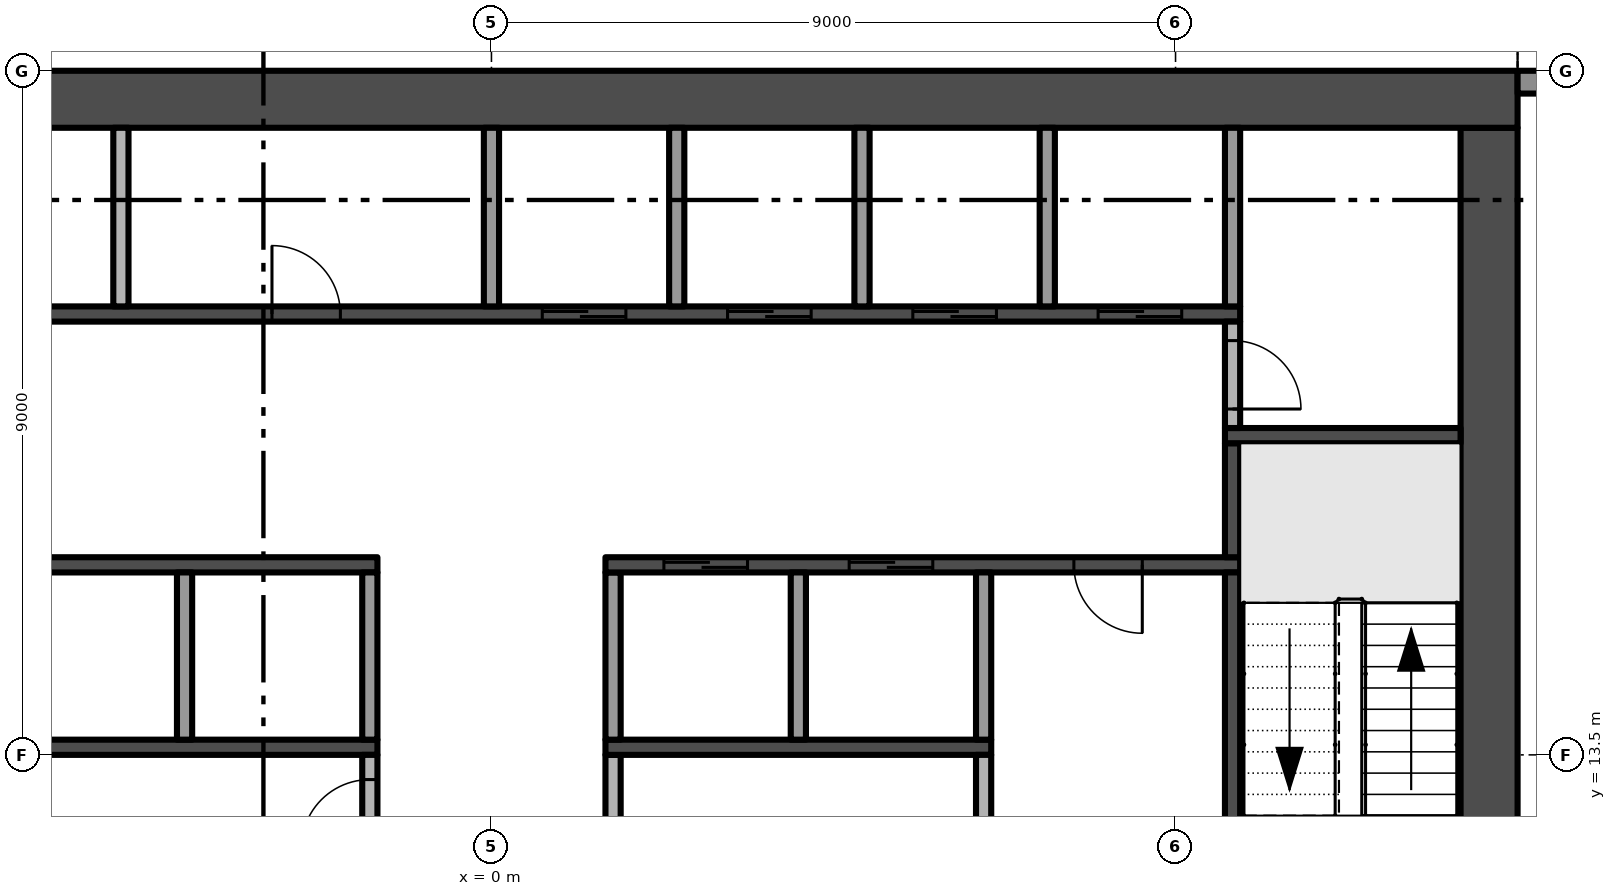
"""IFC4 building model, lengths in metres.
Left out: names, types, materials, properties, quantities, classifications, styles, units other than length and angle.
Written with IfcOpenShell. Run it as: python <this file> out.ifc"""

import sys

from ifc_helpers import new_model, si_unit, direction, frame, frame_2d, origin, place, context, subcontext, project, spatial, rectangle, extrude, element, fill, save


model = new_model("IFC4")
c1 = context("Model", 3, precision=1e-05, world=origin(), true_north=direction((0.0, 1.0)))
c2 = subcontext(c1, "Body", "Model", "MODEL_VIEW")
j1 = project(units=[si_unit("LENGTHUNIT", "METRE"), si_unit("PLANEANGLEUNIT", "RADIAN")], contexts=[c1])
p1 = place(None, origin())
s1 = spatial("IfcSite", under=j1, at=p1, CompositionType="ELEMENT")
p2 = place(p1, origin())
s2 = spatial("IfcBuilding", under=s1, at=p2, CompositionType="ELEMENT")
p3 = place(p2, frame((0.0, 0.0, 166.8)))
s3 = spatial("IfcBuildingStorey", under=s2, at=p3, CompositionType="ELEMENT", Elevation=166.8)
p4 = place(p3, frame((13.125, 5.25, -0.3), z_axis=(0.0, 0.0, 1.0), x_axis=(0.0, 1.0, 0.0)))
e1 = element("IfcWall", 1, at=p4, inside=s3, PredefinedType="SHEAR", context=c2, shape_type="SweptSolid", body=[
    extrude(rectangle(XDim=16.5, YDim=0.75, at=frame_2d((8.25, 0.0))), origin(), (0.0, 0.0, 1.0), 3.8),
])
p5 = place(p4, frame((6.15, 0.0, 0.3)))
e2 = element("IfcOpeningElement", 2, at=p5, cuts=e1, PredefinedType="OPENING", context=c2, shape_type="SweptSolid", body=[
    extrude(rectangle(XDim=1.2, YDim=2.2, at=frame_2d((0.6, 1.1))), frame((0.0, 0.385, 0.0), z_axis=(0.0, -1.0, 0.0), x_axis=(1.0, 0.0, 0.0)), (0.0, 0.0, 1.0), 0.77),
])
p6 = place(p3, frame((13.5, 22.125, -0.3), z_axis=(0.0, 0.0, 1.0), x_axis=(-1.0, 0.0, 0.0)))
e3 = element("IfcWall", 3, at=p6, inside=s3, PredefinedType="SHEAR", context=c2, shape_type="SweptSolid", body=[
    extrude(rectangle(XDim=27.0, YDim=0.75, at=frame_2d((13.5, 0.0))), origin(), (0.0, 0.0, 1.0), 3.8),
])
p7 = place(p3, frame((13.5, 22.35, 0.0), z_axis=(0.0, 0.0, 1.0), x_axis=(1.0, 0.0, 0.0)))
e4 = element("IfcWall", 4, at=p7, inside=s3, PredefinedType="SOLIDWALL", context=c2, shape_type="SweptSolid", body=[
    extrude(rectangle(XDim=3.4, YDim=0.3, at=frame_2d((1.7, 0.0))), origin(), (0.0, 0.0, 1.0), 3.5),
])
p8 = place(p7, frame((2.05, 0.0, 0.45)))
e5 = element("IfcOpeningElement", 5, at=p8, cuts=e4, PredefinedType="OPENING", context=c2, shape_type="SweptSolid", body=[
    extrude(rectangle(XDim=1.05, YDim=2.65, at=frame_2d((0.525, 1.325))), frame((0.0, 0.16, 0.0), z_axis=(0.0, -1.0, 0.0), x_axis=(1.0, 0.0, 0.0)), (0.0, 0.0, 1.0), 0.32),
])
p9 = place(p7, frame((0.7, 0.0, 0.0)))
e6 = element("IfcOpeningElement", 6, at=p9, cuts=e4, PredefinedType="OPENING", context=c2, shape_type="SweptSolid", body=[
    extrude(rectangle(XDim=1.2, YDim=2.4, at=frame_2d((0.6, 1.2))), frame((0.0, 0.16, 0.0), z_axis=(0.0, -1.0, 0.0), x_axis=(1.0, 0.0, 0.0)), (0.0, 0.0, 1.0), 0.32),
])
p10 = place(p3, frame((-1.5, 16.0, 0.0), z_axis=(0.0, 0.0, 1.0), x_axis=(-1.0, 0.0, 0.0)))
e7 = element("IfcWall", 7, at=p10, inside=s3, PredefinedType="SHEAR", context=c2, shape_type="SweptSolid", body=[
    extrude(rectangle(XDim=8.35, YDim=0.2, at=frame_2d((4.175, 0.0))), origin(), (0.0, 0.0, 1.0), 3.5),
])
p11 = place(p10, frame((6.162, 0.0, 0.0)))
e8 = element("IfcOpeningElement", 8, at=p11, cuts=e7, PredefinedType="OPENING", context=c2, shape_type="SweptSolid", body=[
    extrude(rectangle(XDim=0.9, YDim=2.1, at=frame_2d((0.45, 1.05))), frame((0.0, 0.11, 0.0), z_axis=(0.0, -1.0, 0.0), x_axis=(1.0, 0.0, 0.0)), (0.0, 0.0, 1.0), 0.22),
])
p12 = place(p3, frame((-9.85, 19.3, 0.0), z_axis=(0.0, 0.0, 1.0), x_axis=(1.0, 0.0, 0.0)))
e9 = element("IfcWall", 9, at=p12, inside=s3, PredefinedType="SHEAR", context=c2, shape_type="SweptSolid", body=[
    extrude(rectangle(XDim=19.7, YDim=0.2, at=frame_2d((9.85, 0.0))), origin(), (0.0, 0.0, 1.0), 3.5),
])
p13 = place(p12, frame((10.519, 0.0, 0.0)))
e10 = element("IfcOpeningElement", 10, at=p13, cuts=e9, PredefinedType="OPENING", context=c2, shape_type="SweptSolid", body=[
    extrude(rectangle(XDim=1.1, YDim=2.1, at=frame_2d((0.55, 1.05))), frame((0.0, 0.11, 0.0), z_axis=(0.0, -1.0, 0.0), x_axis=(1.0, 0.0, 0.0)), (0.0, 0.0, 1.0), 0.22),
])
p14 = place(p12, frame((12.956, 0.0, 0.0)))
e11 = element("IfcOpeningElement", 11, at=p14, cuts=e9, PredefinedType="OPENING", context=c2, shape_type="SweptSolid", body=[
    extrude(rectangle(XDim=1.1, YDim=2.1, at=frame_2d((0.55, 1.05))), frame((0.0, 0.11, 0.0), z_axis=(0.0, -1.0, 0.0), x_axis=(1.0, 0.0, 0.0)), (0.0, 0.0, 1.0), 0.22),
])
p15 = place(p12, frame((15.394, 0.0, 0.0)))
e12 = element("IfcOpeningElement", 12, at=p15, cuts=e9, PredefinedType="OPENING", context=c2, shape_type="SweptSolid", body=[
    extrude(rectangle(XDim=1.1, YDim=2.1, at=frame_2d((0.55, 1.05))), frame((0.0, 0.11, 0.0), z_axis=(0.0, -1.0, 0.0), x_axis=(1.0, 0.0, 0.0)), (0.0, 0.0, 1.0), 0.22),
])
p16 = place(p12, frame((17.831, 0.0, 0.0)))
e13 = element("IfcOpeningElement", 13, at=p16, cuts=e9, PredefinedType="OPENING", context=c2, shape_type="SweptSolid", body=[
    extrude(rectangle(XDim=1.1, YDim=2.1, at=frame_2d((0.55, 1.05))), frame((0.0, 0.11, 0.0), z_axis=(0.0, -1.0, 0.0), x_axis=(1.0, 0.0, 0.0)), (0.0, 0.0, 1.0), 0.22),
])
p17 = place(p12, frame((2.087, 0.0, 0.0)))
e14 = element("IfcOpeningElement", 14, at=p17, cuts=e9, PredefinedType="OPENING", context=c2, shape_type="SweptSolid", body=[
    extrude(rectangle(XDim=0.9, YDim=2.1, at=frame_2d((0.45, 1.05))), frame((0.0, 0.11, 0.0), z_axis=(0.0, -1.0, 0.0), x_axis=(1.0, 0.0, 0.0)), (0.0, 0.0, 1.0), 0.22),
])
p18 = place(p12, frame((6.963, 0.0, 0.0)))
e15 = element("IfcOpeningElement", 15, at=p18, cuts=e9, PredefinedType="OPENING", context=c2, shape_type="SweptSolid", body=[
    extrude(rectangle(XDim=0.9, YDim=2.1, at=frame_2d((0.45, 1.05))), frame((0.0, 0.11, 0.0), z_axis=(0.0, -1.0, 0.0), x_axis=(1.0, 0.0, 0.0)), (0.0, 0.0, 1.0), 0.22),
])
p19 = place(p3, frame((-6.575, 13.6, 0.0), z_axis=(0.0, 0.0, 1.0), x_axis=(1.0, 0.0, 0.0)))
e16 = element("IfcWall", 16, at=p19, inside=s3, PredefinedType="SHEAR", context=c2, shape_type="SweptSolid", body=[
    extrude(rectangle(XDim=5.075, YDim=0.2, at=frame_2d((2.538, 0.0))), origin(), (0.0, 0.0, 1.0), 3.5),
])
p20 = place(p3, frame((-4.875, 19.4, 0.0), z_axis=(0.0, 0.0, 1.0), x_axis=(0.0, 1.0, 0.0)))
e17 = element("IfcWall", 17, at=p20, inside=s3, PredefinedType="PARTITIONING", context=c2, shape_type="SweptSolid", body=[
    extrude(rectangle(XDim=2.35, YDim=0.2, at=frame_2d((1.175, 0.0))), origin(), (0.0, 0.0, 1.0), 3.5),
])
p21 = place(p3, frame((-4.037, 13.7, 0.0), z_axis=(0.0, 0.0, 1.0), x_axis=(0.0, 1.0, 0.0)))
e18 = element("IfcWall", 18, at=p21, inside=s3, PredefinedType="PARTITIONING", context=c2, shape_type="SweptSolid", body=[
    extrude(rectangle(XDim=2.2, YDim=0.2, at=frame_2d((1.1, 0.0))), origin(), (0.0, 0.0, 1.0), 3.5),
])
p22 = place(p3, frame((-1.6, 11.95, 0.0), z_axis=(0.0, 0.0, 1.0), x_axis=(0.0, 1.0, 0.0)))
e19 = element("IfcWall", 19, at=p22, inside=s3, PredefinedType="PARTITIONING", context=c2, shape_type="SweptSolid", body=[
    extrude(rectangle(XDim=1.55, YDim=0.2, at=frame_2d((0.775, 0.0))), origin(), (0.0, 0.0, 1.0), 3.5),
])
p23 = place(p22, frame((0.325, 0.0, 0.0)))
e20 = element("IfcOpeningElement", 20, at=p23, cuts=e19, PredefinedType="OPENING", context=c2, shape_type="SweptSolid", body=[
    extrude(rectangle(XDim=0.9, YDim=2.1, at=frame_2d((0.45, 1.05))), frame((0.0, 0.11, 0.0), z_axis=(0.0, -1.0, 0.0), x_axis=(1.0, 0.0, 0.0)), (0.0, 0.0, 1.0), 0.22),
])
p24 = place(p3, frame((-1.6, 13.7, 0.0), z_axis=(0.0, 0.0, 1.0), x_axis=(0.0, 1.0, 0.0)))
e21 = element("IfcWall", 21, at=p24, inside=s3, PredefinedType="PARTITIONING", context=c2, shape_type="SweptSolid", body=[
    extrude(rectangle(XDim=2.2, YDim=0.2, at=frame_2d((1.1, 0.0))), origin(), (0.0, 0.0, 1.0), 3.5),
])
p25 = place(p3, frame((0.0, 19.4, 0.0), z_axis=(0.0, 0.0, 1.0), x_axis=(0.0, 1.0, 0.0)))
e22 = element("IfcWall", 22, at=p25, inside=s3, PredefinedType="PARTITIONING", context=c2, shape_type="SweptSolid", body=[
    extrude(rectangle(XDim=2.35, YDim=0.2, at=frame_2d((1.175, 0.0))), origin(), (0.0, 0.0, 1.0), 3.5),
])
p26 = place(p3, frame((1.6, 13.5, 0.0), z_axis=(0.0, 0.0, 1.0), x_axis=(0.0, -1.0, 0.0)))
e23 = element("IfcWall", 23, at=p26, inside=s3, PredefinedType="PARTITIONING", context=c2, shape_type="SweptSolid", body=[
    extrude(rectangle(XDim=2.9, YDim=0.2, at=frame_2d((1.45, 0.0))), origin(), (0.0, 0.0, 1.0), 3.5),
])
p27 = place(p26, frame((1.0, 0.0, 0.0)))
e24 = element("IfcOpeningElement", 24, at=p27, cuts=e23, PredefinedType="OPENING", context=c2, shape_type="SweptSolid", body=[
    extrude(rectangle(XDim=0.9, YDim=2.1, at=frame_2d((0.45, 1.05))), frame((0.0, 0.11, 0.0), z_axis=(0.0, -1.0, 0.0), x_axis=(1.0, 0.0, 0.0)), (0.0, 0.0, 1.0), 0.22),
])
p28 = place(p3, frame((1.5, 13.6, 0.0), z_axis=(0.0, 0.0, 1.0), x_axis=(1.0, 0.0, 0.0)))
e25 = element("IfcWall", 25, at=p28, inside=s3, PredefinedType="SHEAR", context=c2, shape_type="SweptSolid", body=[
    extrude(rectangle(XDim=5.075, YDim=0.2, at=frame_2d((2.538, 0.0))), origin(), (0.0, 0.0, 1.0), 3.5),
])
p29 = place(p3, frame((1.6, 13.7, 0.0), z_axis=(0.0, 0.0, 1.0), x_axis=(0.0, 1.0, 0.0)))
e26 = element("IfcWall", 26, at=p29, inside=s3, PredefinedType="PARTITIONING", context=c2, shape_type="SweptSolid", body=[
    extrude(rectangle(XDim=2.2, YDim=0.2, at=frame_2d((1.1, 0.0))), origin(), (0.0, 0.0, 1.0), 3.5),
])
p30 = place(p3, frame((9.85, 16.0, 0.0), z_axis=(0.0, 0.0, 1.0), x_axis=(-1.0, 0.0, 0.0)))
e27 = element("IfcWall", 27, at=p30, inside=s3, PredefinedType="SHEAR", context=c2, shape_type="SweptSolid", body=[
    extrude(rectangle(XDim=8.35, YDim=0.2, at=frame_2d((4.175, 0.0))), origin(), (0.0, 0.0, 1.0), 3.5),
])
p31 = place(p30, frame((6.481, 0.0, 0.0)))
e28 = element("IfcOpeningElement", 28, at=p31, cuts=e27, PredefinedType="OPENING", context=c2, shape_type="SweptSolid", body=[
    extrude(rectangle(XDim=1.1, YDim=2.1, at=frame_2d((0.55, 1.05))), frame((0.0, 0.11, 0.0), z_axis=(0.0, -1.0, 0.0), x_axis=(1.0, 0.0, 0.0)), (0.0, 0.0, 1.0), 0.22),
])
p32 = place(p30, frame((4.044, 0.0, 0.0)))
e29 = element("IfcOpeningElement", 29, at=p32, cuts=e27, PredefinedType="OPENING", context=c2, shape_type="SweptSolid", body=[
    extrude(rectangle(XDim=1.1, YDim=2.1, at=frame_2d((0.55, 1.05))), frame((0.0, 0.11, 0.0), z_axis=(0.0, -1.0, 0.0), x_axis=(1.0, 0.0, 0.0)), (0.0, 0.0, 1.0), 0.22),
])
p33 = place(p30, frame((1.288, 0.0, 0.0)))
e30 = element("IfcOpeningElement", 30, at=p33, cuts=e27, PredefinedType="OPENING", context=c2, shape_type="SweptSolid", body=[
    extrude(rectangle(XDim=0.9, YDim=2.1, at=frame_2d((0.45, 1.05))), frame((0.0, 0.11, 0.0), z_axis=(0.0, -1.0, 0.0), x_axis=(1.0, 0.0, 0.0)), (0.0, 0.0, 1.0), 0.22),
])
p34 = place(p3, frame((2.438, 19.4, 0.0), z_axis=(0.0, 0.0, 1.0), x_axis=(0.0, 1.0, 0.0)))
e31 = element("IfcWall", 31, at=p34, inside=s3, PredefinedType="PARTITIONING", context=c2, shape_type="SweptSolid", body=[
    extrude(rectangle(XDim=2.35, YDim=0.2, at=frame_2d((1.175, 0.0))), origin(), (0.0, 0.0, 1.0), 3.5),
])
p35 = place(p3, frame((4.037, 13.7, 0.0), z_axis=(0.0, 0.0, 1.0), x_axis=(0.0, 1.0, 0.0)))
e32 = element("IfcWall", 32, at=p35, inside=s3, PredefinedType="PARTITIONING", context=c2, shape_type="SweptSolid", body=[
    extrude(rectangle(XDim=2.2, YDim=0.2, at=frame_2d((1.1, 0.0))), origin(), (0.0, 0.0, 1.0), 3.5),
])
p36 = place(p3, frame((4.875, 19.4, 0.0), z_axis=(0.0, 0.0, 1.0), x_axis=(0.0, 1.0, 0.0)))
e33 = element("IfcWall", 33, at=p36, inside=s3, PredefinedType="PARTITIONING", context=c2, shape_type="SweptSolid", body=[
    extrude(rectangle(XDim=2.35, YDim=0.2, at=frame_2d((1.175, 0.0))), origin(), (0.0, 0.0, 1.0), 3.5),
])
p37 = place(p3, frame((6.475, 12.3, 0.0), z_axis=(0.0, 0.0, 1.0), x_axis=(0.0, 1.0, 0.0)))
e34 = element("IfcWall", 34, at=p37, inside=s3, PredefinedType="PARTITIONING", context=c2, shape_type="SweptSolid", body=[
    extrude(rectangle(XDim=1.2, YDim=0.2, at=frame_2d((0.6, 0.0))), origin(), (0.0, 0.0, 1.0), 3.5),
])
p38 = place(p3, frame((6.475, 13.7, 0.0), z_axis=(0.0, 0.0, 1.0), x_axis=(0.0, 1.0, 0.0)))
e35 = element("IfcWall", 35, at=p38, inside=s3, PredefinedType="PARTITIONING", context=c2, shape_type="SweptSolid", body=[
    extrude(rectangle(XDim=2.2, YDim=0.2, at=frame_2d((1.1, 0.0))), origin(), (0.0, 0.0, 1.0), 3.5),
])
p39 = place(p3, frame((7.312, 19.4, 0.0), z_axis=(0.0, 0.0, 1.0), x_axis=(0.0, 1.0, 0.0)))
e36 = element("IfcWall", 36, at=p39, inside=s3, PredefinedType="PARTITIONING", context=c2, shape_type="SweptSolid", body=[
    extrude(rectangle(XDim=2.35, YDim=0.2, at=frame_2d((1.175, 0.0))), origin(), (0.0, 0.0, 1.0), 3.5),
])
p40 = place(p3, frame((9.75, 12.3, 0.0), z_axis=(0.0, 0.0, 1.0), x_axis=(0.0, 1.0, 0.0)))
e37 = element("IfcWall", 37, at=p40, inside=s3, PredefinedType="SHEAR", context=c2, shape_type="SweptSolid", body=[
    extrude(rectangle(XDim=3.6, YDim=0.2, at=frame_2d((1.8, 0.0))), origin(), (0.0, 0.0, 1.0), 3.5),
])
p41 = place(p3, frame((9.75, 16.1, 0.0), z_axis=(0.0, 0.0, 1.0), x_axis=(0.0, 1.0, 0.0)))
e38 = element("IfcWall", 38, at=p41, inside=s3, PredefinedType="SHEAR", context=c2, shape_type="SweptSolid", body=[
    extrude(rectangle(XDim=1.5, YDim=0.2, at=frame_2d((0.75, 0.0))), origin(), (0.0, 0.0, 1.0), 3.5),
])
p42 = place(p3, frame((9.65, 17.7, 0.0), z_axis=(0.0, 0.0, 1.0), x_axis=(1.0, 0.0, 0.0)))
e39 = element("IfcWall", 39, at=p42, inside=s3, PredefinedType="SHEAR", context=c2, shape_type="SweptSolid", body=[
    extrude(rectangle(XDim=3.1, YDim=0.2, at=frame_2d((1.55, 0.0))), origin(), (0.0, 0.0, 1.0), 3.5),
])
p43 = place(p3, frame((9.75, 19.2, 0.0), z_axis=(0.0, 0.0, 1.0), x_axis=(0.0, -1.0, 0.0)))
e40 = element("IfcWall", 40, at=p43, inside=s3, PredefinedType="PARTITIONING", context=c2, shape_type="SweptSolid", body=[
    extrude(rectangle(XDim=1.4, YDim=0.2, at=frame_2d((0.7, 0.0))), origin(), (0.0, 0.0, 1.0), 3.5),
])
p44 = place(p43, frame((0.25, 0.0, 0.0)))
e41 = element("IfcOpeningElement", 41, at=p44, cuts=e40, PredefinedType="OPENING", context=c2, shape_type="SweptSolid", body=[
    extrude(rectangle(XDim=0.9, YDim=2.1, at=frame_2d((0.45, 1.05))), frame((0.0, 0.11, 0.0), z_axis=(0.0, -1.0, 0.0), x_axis=(1.0, 0.0, 0.0)), (0.0, 0.0, 1.0), 0.22),
])
p45 = place(p3, frame((9.75, 19.4, 0.0), z_axis=(0.0, 0.0, 1.0), x_axis=(0.0, 1.0, 0.0)))
e42 = element("IfcWall", 42, at=p45, inside=s3, PredefinedType="PARTITIONING", context=c2, shape_type="SweptSolid", body=[
    extrude(rectangle(XDim=2.35, YDim=0.2, at=frame_2d((1.175, 0.0))), origin(), (0.0, 0.0, 1.0), 3.5),
])
p46 = place(p13, origin())
e43 = element("IfcDoor", 43, at=p46, inside=s3, OperationType="SLIDING_TO_RIGHT", PredefinedType="DOOR", context=c2, shape_type="SweptSolid", body=[
    extrude(rectangle(XDim=1.1, YDim=2.1, at=frame_2d((0.55, 1.05))), frame((0.0, 0.025, 0.0), z_axis=(0.0, -1.0, 0.0), x_axis=(1.0, 0.0, 0.0)), (0.0, 0.0, 1.0), 0.05),
])
fill(e10, e43)
p47 = place(p14, origin())
e44 = element("IfcDoor", 44, at=p47, inside=s3, OperationType="SLIDING_TO_RIGHT", PredefinedType="DOOR", context=c2, shape_type="SweptSolid", body=[
    extrude(rectangle(XDim=1.1, YDim=2.1, at=frame_2d((0.55, 1.05))), frame((0.0, 0.025, 0.0), z_axis=(0.0, -1.0, 0.0), x_axis=(1.0, 0.0, 0.0)), (0.0, 0.0, 1.0), 0.05),
])
fill(e11, e44)
p48 = place(p15, origin())
e45 = element("IfcDoor", 45, at=p48, inside=s3, OperationType="SLIDING_TO_RIGHT", PredefinedType="DOOR", context=c2, shape_type="SweptSolid", body=[
    extrude(rectangle(XDim=1.1, YDim=2.1, at=frame_2d((0.55, 1.05))), frame((0.0, 0.025, 0.0), z_axis=(0.0, -1.0, 0.0), x_axis=(1.0, 0.0, 0.0)), (0.0, 0.0, 1.0), 0.05),
])
fill(e12, e45)
p49 = place(p16, origin())
e46 = element("IfcDoor", 46, at=p49, inside=s3, OperationType="SLIDING_TO_RIGHT", PredefinedType="DOOR", context=c2, shape_type="SweptSolid", body=[
    extrude(rectangle(XDim=1.1, YDim=2.1, at=frame_2d((0.55, 1.05))), frame((0.0, 0.025, 0.0), z_axis=(0.0, -1.0, 0.0), x_axis=(1.0, 0.0, 0.0)), (0.0, 0.0, 1.0), 0.05),
])
fill(e13, e46)
p50 = place(p31, origin())
e47 = element("IfcDoor", 47, at=p50, inside=s3, OperationType="SLIDING_TO_RIGHT", PredefinedType="DOOR", context=c2, shape_type="SweptSolid", body=[
    extrude(rectangle(XDim=1.1, YDim=2.1, at=frame_2d((0.55, 1.05))), frame((0.0, 0.025, 0.0), z_axis=(0.0, -1.0, 0.0), x_axis=(1.0, 0.0, 0.0)), (0.0, 0.0, 1.0), 0.05),
])
fill(e28, e47)
p51 = place(p32, origin())
e48 = element("IfcDoor", 48, at=p51, inside=s3, OperationType="SLIDING_TO_RIGHT", PredefinedType="DOOR", context=c2, shape_type="SweptSolid", body=[
    extrude(rectangle(XDim=1.1, YDim=2.1, at=frame_2d((0.55, 1.05))), frame((0.0, 0.025, 0.0), z_axis=(0.0, -1.0, 0.0), x_axis=(1.0, 0.0, 0.0)), (0.0, 0.0, 1.0), 0.05),
])
fill(e29, e48)
p52 = place(p23, origin())
e49 = element("IfcDoor", 49, at=p52, inside=s3, OperationType="SINGLE_SWING_LEFT", PredefinedType="DOOR", context=c2, shape_type="SweptSolid", body=[
    extrude(rectangle(XDim=0.9, YDim=2.1, at=frame_2d((0.45, 1.05))), frame((0.0, 0.025, 0.0), z_axis=(0.0, -1.0, 0.0), x_axis=(1.0, 0.0, 0.0)), (0.0, 0.0, 1.0), 0.05),
])
fill(e20, e49)
p53 = place(p33, origin())
e50 = element("IfcDoor", 50, at=p53, inside=s3, OperationType="SINGLE_SWING_LEFT", PredefinedType="DOOR", context=c2, shape_type="SweptSolid", body=[
    extrude(rectangle(XDim=0.9, YDim=2.1, at=frame_2d((0.45, 1.05))), frame((0.0, 0.025, 0.0), z_axis=(0.0, -1.0, 0.0), x_axis=(1.0, 0.0, 0.0)), (0.0, 0.0, 1.0), 0.05),
])
fill(e30, e50)
p54 = place(p44, origin())
e51 = element("IfcDoor", 51, at=p54, inside=s3, OperationType="SINGLE_SWING_RIGHT", PredefinedType="DOOR", context=c2, shape_type="SweptSolid", body=[
    extrude(rectangle(XDim=0.9, YDim=2.1, at=frame_2d((0.45, 1.05))), frame((0.0, 0.025, 0.0), z_axis=(0.0, -1.0, 0.0), x_axis=(1.0, 0.0, 0.0)), (0.0, 0.0, 1.0), 0.05),
])
fill(e41, e51)
p55 = place(p18, origin())
e52 = element("IfcDoor", 52, at=p55, inside=s3, OperationType="SINGLE_SWING_LEFT", PredefinedType="DOOR", context=c2, shape_type="SweptSolid", body=[
    extrude(rectangle(XDim=0.9, YDim=2.1, at=frame_2d((0.45, 1.05))), frame((0.0, 0.025, 0.0), z_axis=(0.0, -1.0, 0.0), x_axis=(1.0, 0.0, 0.0)), (0.0, 0.0, 1.0), 0.05),
])
fill(e15, e52)
save(model, sys.argv[1])
